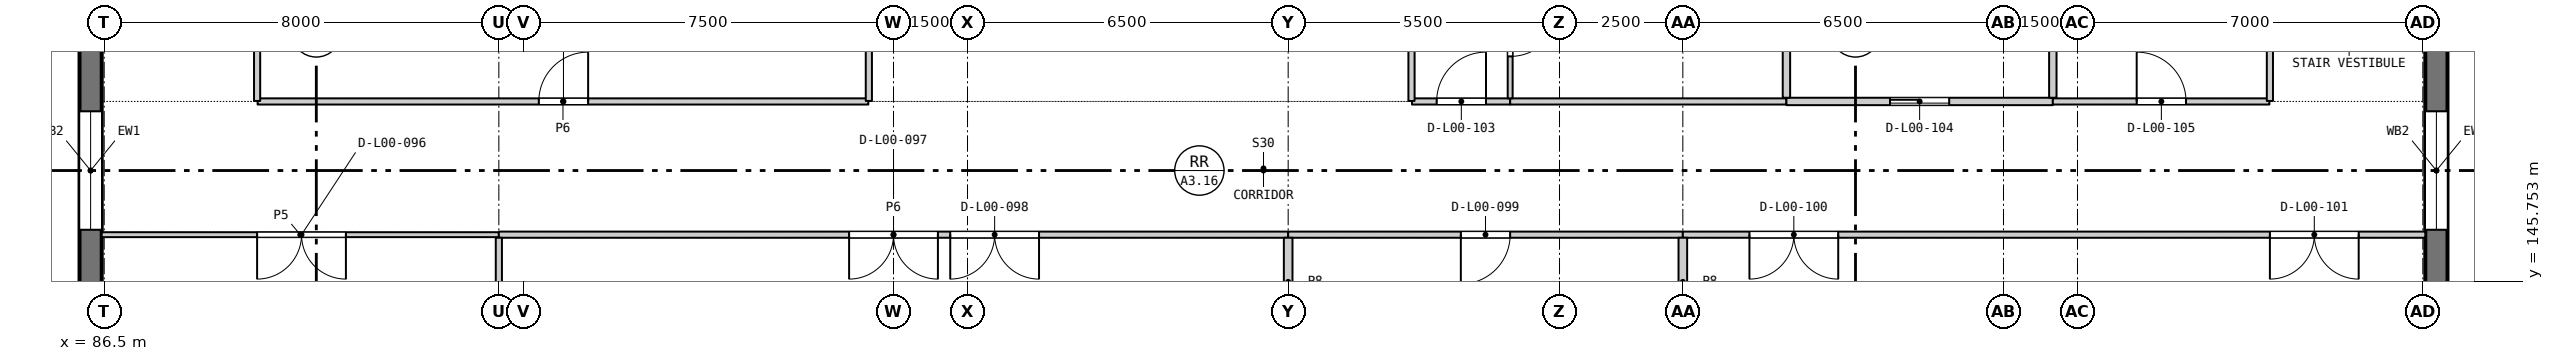
"""IFC4 building model, lengths in metres.
Left out: names, types, materials, properties, quantities, classifications, styles, units other than length and angle.
Written with IfcOpenShell. Run it as: python <this file> out.ifc"""

import sys

from ifc_helpers import new_model, si_unit, direction, frame, frame_2d, origin, place, context, subcontext, project, spatial, rectangle, extrude, element, fill, save


model = new_model("IFC4")
c1 = context("Model", 3, precision=1e-05, world=origin(), true_north=direction((0.0, 1.0)))
c2 = subcontext(c1, "Body", "Model", "MODEL_VIEW")
j1 = project(units=[si_unit("LENGTHUNIT", "METRE"), si_unit("PLANEANGLEUNIT", "RADIAN")], contexts=[c1])
p1 = place(None, origin())
s1 = spatial("IfcSite", under=j1, at=p1, CompositionType="ELEMENT")
p2 = place(p1, origin())
s2 = spatial("IfcBuilding", under=s1, at=p2, CompositionType="ELEMENT")
p3 = place(p2, origin())
s3 = spatial("IfcBuildingStorey", under=s2, at=p3, CompositionType="ELEMENT", Elevation=0.0)
p4 = place(p3, frame((86.225, 144.85, 0.0), z_axis=(0.0, 0.0, 1.0), x_axis=(0.0, 1.0, 0.0)))
e1 = element("IfcWall", 1, at=p4, inside=s3, PredefinedType="SOLIDWALL", context=c2, shape_type="SweptSolid", body=[
    extrude(rectangle(XDim=6.3, YDim=0.45, at=frame_2d((3.15, 0.0))), origin(), (0.0, 0.0, 1.0), 5.0),
])
p5 = place(p4, frame((1.95, 0.0, 0.9)))
e2 = element("IfcOpeningElement", 2, at=p5, cuts=e1, PredefinedType="OPENING", context=c2, shape_type="SweptSolid", body=[
    extrude(rectangle(XDim=2.4, YDim=1.6, at=frame_2d((1.2, 0.8))), frame((0.0, 0.235, 0.0), z_axis=(0.0, -1.0, 0.0), x_axis=(1.0, 0.0, 0.0)), (0.0, 0.0, 1.0), 0.47),
])
p6 = place(p3, frame((133.775, 151.15, 0.0), z_axis=(0.0, 0.0, 1.0), x_axis=(0.0, -1.0, 0.0)))
e3 = element("IfcWall", 3, at=p6, inside=s3, PredefinedType="SOLIDWALL", context=c2, shape_type="SweptSolid", body=[
    extrude(rectangle(XDim=6.3, YDim=0.45, at=frame_2d((3.15, 0.0))), origin(), (0.0, 0.0, 1.0), 5.0),
])
p7 = place(p6, frame((1.95, 0.0, 0.9)))
e4 = element("IfcOpeningElement", 4, at=p7, cuts=e3, PredefinedType="OPENING", context=c2, shape_type="SweptSolid", body=[
    extrude(rectangle(XDim=2.4, YDim=1.6, at=frame_2d((1.2, 0.8))), frame((0.0, 0.235, 0.0), z_axis=(0.0, -1.0, 0.0), x_axis=(1.0, 0.0, 0.0)), (0.0, 0.0, 1.0), 0.47),
])
p8 = place(p3, frame((86.45, 146.7, 0.0), z_axis=(0.0, 0.0, 1.0), x_axis=(1.0, 0.0, 0.0)))
e5 = element("IfcWall", 5, at=p8, inside=s3, PredefinedType="PARTITIONING", context=c2, shape_type="SweptSolid", body=[
    extrude(rectangle(XDim=8.05, YDim=0.1, at=frame_2d((4.025, 0.0))), origin(), (0.0, 0.0, 1.0), 5.7),
])
p9 = place(p8, frame((3.15, 0.0, 0.0)))
e6 = element("IfcOpeningElement", 6, at=p9, cuts=e5, PredefinedType="OPENING", context=c2, shape_type="SweptSolid", body=[
    extrude(rectangle(XDim=1.8, YDim=2.1, at=frame_2d((0.9, 1.05))), frame((0.0, 0.06, 0.0), z_axis=(0.0, -1.0, 0.0), x_axis=(1.0, 0.0, 0.0)), (0.0, 0.0, 1.0), 0.12),
])
p10 = place(p3, frame((94.5, 146.7, 0.0), z_axis=(0.0, 0.0, 1.0), x_axis=(1.0, 0.0, 0.0)))
e7 = element("IfcWall", 7, at=p10, inside=s3, PredefinedType="PARTITIONING", context=c2, shape_type="SweptSolid", body=[
    extrude(rectangle(XDim=16.0, YDim=0.125, at=frame_2d((8.0, 0.0))), origin(), (0.0, 0.0, 1.0), 5.7),
])
p11 = place(p10, frame((7.1, 0.0, 0.0)))
e8 = element("IfcOpeningElement", 8, at=p11, cuts=e7, PredefinedType="OPENING", context=c2, shape_type="SweptSolid", body=[
    extrude(rectangle(XDim=1.8, YDim=2.1, at=frame_2d((0.9, 1.05))), frame((0.0, 0.073, 0.0), z_axis=(0.0, -1.0, 0.0), x_axis=(1.0, 0.0, 0.0)), (0.0, 0.0, 1.0), 0.145),
])
p12 = place(p10, frame((9.15, 0.0, 0.0)))
e9 = element("IfcOpeningElement", 9, at=p12, cuts=e7, PredefinedType="OPENING", context=c2, shape_type="SweptSolid", body=[
    extrude(rectangle(XDim=1.8, YDim=2.1, at=frame_2d((0.9, 1.05))), frame((0.0, 0.073, 0.0), z_axis=(0.0, -1.0, 0.0), x_axis=(1.0, 0.0, 0.0)), (0.0, 0.0, 1.0), 0.145),
])
p13 = place(p3, frame((110.5, 146.7, 0.0), z_axis=(0.0, 0.0, 1.0), x_axis=(1.0, 0.0, 0.0)))
e10 = element("IfcWall", 10, at=p13, inside=s3, PredefinedType="PARTITIONING", context=c2, shape_type="SweptSolid", body=[
    extrude(rectangle(XDim=8.0, YDim=0.125, at=frame_2d((4.0, 0.0))), origin(), (0.0, 0.0, 1.0), 5.7),
])
p14 = place(p13, frame((3.5, 0.0, 0.0)))
e11 = element("IfcOpeningElement", 11, at=p14, cuts=e10, PredefinedType="OPENING", context=c2, shape_type="SweptSolid", body=[
    extrude(rectangle(XDim=1.0, YDim=2.1, at=frame_2d((0.5, 1.05))), frame((0.0, 0.073, 0.0), z_axis=(0.0, -1.0, 0.0), x_axis=(1.0, 0.0, 0.0)), (0.0, 0.0, 1.0), 0.145),
])
p15 = place(p3, frame((118.5, 146.7, 0.0), z_axis=(0.0, 0.0, 1.0), x_axis=(1.0, 0.0, 0.0)))
e12 = element("IfcWall", 12, at=p15, inside=s3, PredefinedType="PARTITIONING", context=c2, shape_type="SweptSolid", body=[
    extrude(rectangle(XDim=15.05, YDim=0.125, at=frame_2d((7.525, 0.0))), origin(), (0.0, 0.0, 1.0), 5.7),
])
p16 = place(p15, frame((1.35, 0.0, 0.0)))
e13 = element("IfcOpeningElement", 13, at=p16, cuts=e12, PredefinedType="OPENING", context=c2, shape_type="SweptSolid", body=[
    extrude(rectangle(XDim=1.8, YDim=2.1, at=frame_2d((0.9, 1.05))), frame((0.0, 0.073, 0.0), z_axis=(0.0, -1.0, 0.0), x_axis=(1.0, 0.0, 0.0)), (0.0, 0.0, 1.0), 0.145),
])
p17 = place(p15, frame((11.9, 0.0, 0.0)))
e14 = element("IfcOpeningElement", 14, at=p17, cuts=e12, PredefinedType="OPENING", context=c2, shape_type="SweptSolid", body=[
    extrude(rectangle(XDim=1.8, YDim=2.1, at=frame_2d((0.9, 1.05))), frame((0.0, 0.073, 0.0), z_axis=(0.0, -1.0, 0.0), x_axis=(1.0, 0.0, 0.0)), (0.0, 0.0, 1.0), 0.145),
])
p18 = place(p3, frame((89.61, 149.4, 0.0), z_axis=(0.0, 0.0, 1.0), x_axis=(1.0, 0.0, 0.0)))
e15 = element("IfcWall", 15, at=p18, inside=s3, PredefinedType="PARTITIONING", context=c2, shape_type="SweptSolid", body=[
    extrude(rectangle(XDim=12.38, YDim=0.125, at=frame_2d((6.19, 0.0))), origin(), (0.0, 0.0, 1.0), 5.7),
])
p19 = place(p18, frame((5.7, 0.0, 0.0)))
e16 = element("IfcOpeningElement", 16, at=p19, cuts=e15, PredefinedType="OPENING", context=c2, shape_type="SweptSolid", body=[
    extrude(rectangle(XDim=1.0, YDim=2.1, at=frame_2d((0.5, 1.05))), frame((0.0, 0.073, 0.0), z_axis=(0.0, -1.0, 0.0), x_axis=(1.0, 0.0, 0.0)), (0.0, 0.0, 1.0), 0.145),
])
p20 = place(p3, frame((113.01, 149.4, 0.0), z_axis=(0.0, 0.0, 1.0), x_axis=(1.0, 0.0, 0.0)))
e17 = element("IfcWall", 17, at=p20, inside=s3, PredefinedType="PARTITIONING", context=c2, shape_type="SweptSolid", body=[
    extrude(rectangle(XDim=1.99, YDim=0.125, at=frame_2d((0.995, 0.0))), origin(), (0.0, 0.0, 1.0), 5.7),
])
p21 = place(p20, frame((0.5, 0.0, 0.0)))
e18 = element("IfcOpeningElement", 18, at=p21, cuts=e17, PredefinedType="OPENING", context=c2, shape_type="SweptSolid", body=[
    extrude(rectangle(XDim=1.0, YDim=2.1, at=frame_2d((0.5, 1.05))), frame((0.0, 0.073, 0.0), z_axis=(0.0, -1.0, 0.0), x_axis=(1.0, 0.0, 0.0)), (0.0, 0.0, 1.0), 0.145),
])
p22 = place(p3, frame((115.0, 149.4, 0.0), z_axis=(0.0, 0.0, 1.0), x_axis=(1.0, 0.0, 0.0)))
e19 = element("IfcWall", 19, at=p22, inside=s3, PredefinedType="PARTITIONING", context=c2, shape_type="SweptSolid", body=[
    extrude(rectangle(XDim=5.6, YDim=0.125, at=frame_2d((2.8, 0.0))), origin(), (0.0, 0.0, 1.0), 5.7),
])
p23 = place(p3, frame((120.6, 149.4, 0.0), z_axis=(0.0, 0.0, 1.0), x_axis=(1.0, 0.0, 0.0)))
e20 = element("IfcWall", 20, at=p23, inside=s3, PredefinedType="PARTITIONING", context=c2, shape_type="SweptSolid", body=[
    extrude(rectangle(XDim=5.4, YDim=0.15, at=frame_2d((2.7, 0.0))), origin(), (0.0, 0.0, 1.0), 5.7),
])
p24 = place(p23, frame((2.1, 0.0, 0.0)))
e21 = element("IfcOpeningElement", 21, at=p24, cuts=e20, PredefinedType="OPENING", context=c2, shape_type="SweptSolid", body=[
    extrude(rectangle(XDim=1.2, YDim=2.4, at=frame_2d((0.6, 1.2))), frame((0.0, 0.085, 0.0), z_axis=(0.0, -1.0, 0.0), x_axis=(1.0, 0.0, 0.0)), (0.0, 0.0, 1.0), 0.17),
])
p25 = place(p3, frame((126.0, 149.4, 0.0), z_axis=(0.0, 0.0, 1.0), x_axis=(1.0, 0.0, 0.0)))
e22 = element("IfcWall", 22, at=p25, inside=s3, PredefinedType="PARTITIONING", context=c2, shape_type="SweptSolid", body=[
    extrude(rectangle(XDim=4.39, YDim=0.125, at=frame_2d((2.195, 0.0))), origin(), (0.0, 0.0, 1.0), 5.7),
])
p26 = place(p25, frame((1.7, 0.0, 0.0)))
e23 = element("IfcOpeningElement", 23, at=p26, cuts=e22, PredefinedType="OPENING", context=c2, shape_type="SweptSolid", body=[
    extrude(rectangle(XDim=1.0, YDim=2.1, at=frame_2d((0.5, 1.05))), frame((0.0, 0.073, 0.0), z_axis=(0.0, -1.0, 0.0), x_axis=(1.0, 0.0, 0.0)), (0.0, 0.0, 1.0), 0.145),
])
p27 = place(p3, frame((89.6, 149.41, 0.0), z_axis=(0.0, 0.0, 1.0), x_axis=(0.0, 1.0, 0.0)))
e24 = element("IfcWall", 24, at=p27, inside=s3, PredefinedType="PARTITIONING", context=c2, shape_type="SweptSolid", body=[
    extrude(rectangle(XDim=8.29, YDim=0.125, at=frame_2d((4.145, 0.0))), origin(), (0.0, 0.0, 1.0), 5.7),
])
p28 = place(p3, frame((94.5, 144.85, 0.0), z_axis=(0.0, 0.0, 1.0), x_axis=(0.0, 1.0, 0.0)))
e25 = element("IfcWall", 25, at=p28, inside=s3, PredefinedType="PARTITIONING", context=c2, shape_type="SweptSolid", body=[
    extrude(rectangle(XDim=1.787, YDim=0.125, at=frame_2d((0.894, 0.0))), origin(), (0.0, 0.0, 1.0), 5.0),
])
p29 = place(p3, frame((102.0, 149.41, 0.0), z_axis=(0.0, 0.0, 1.0), x_axis=(0.0, 1.0, 0.0)))
e26 = element("IfcWall", 26, at=p29, inside=s3, PredefinedType="PARTITIONING", context=c2, shape_type="SweptSolid", body=[
    extrude(rectangle(XDim=8.29, YDim=0.125, at=frame_2d((4.145, 0.0))), origin(), (0.0, 0.0, 1.0), 5.7),
])
p30 = place(p3, frame((110.5, 144.85, 0.0), z_axis=(0.0, 0.0, 1.0), x_axis=(0.0, 1.0, 0.0)))
e27 = element("IfcWall", 27, at=p30, inside=s3, PredefinedType="PARTITIONING", context=c2, shape_type="SweptSolid", body=[
    extrude(rectangle(XDim=1.787, YDim=0.175, at=frame_2d((0.894, 0.0))), origin(), (0.0, 0.0, 1.0), 5.0),
])
p31 = place(p3, frame((113.0, 149.41, 0.0), z_axis=(0.0, 0.0, 1.0), x_axis=(0.0, 1.0, 0.0)))
e28 = element("IfcWall", 28, at=p31, inside=s3, PredefinedType="PARTITIONING", context=c2, shape_type="SweptSolid", body=[
    extrude(rectangle(XDim=8.29, YDim=0.125, at=frame_2d((4.145, 0.0))), origin(), (0.0, 0.0, 1.0), 5.7),
])
p32 = place(p3, frame((115.0, 149.462, 0.0), z_axis=(0.0, 0.0, 1.0), x_axis=(0.0, 1.0, 0.0)))
e29 = element("IfcWall", 29, at=p32, inside=s3, PredefinedType="PARTITIONING", context=c2, shape_type="SweptSolid", body=[
    extrude(rectangle(XDim=2.704, YDim=0.1, at=frame_2d((1.352, 0.0))), origin(), (0.0, 0.0, 1.0), 5.7),
])
p33 = place(p32, frame((0.85, 0.0, 0.0)))
e30 = element("IfcOpeningElement", 30, at=p33, cuts=e29, PredefinedType="OPENING", context=c2, shape_type="SweptSolid", body=[
    extrude(rectangle(XDim=1.0, YDim=2.1, at=frame_2d((0.5, 1.05))), frame((0.0, 0.06, 0.0), z_axis=(0.0, -1.0, 0.0), x_axis=(1.0, 0.0, 0.0)), (0.0, 0.0, 1.0), 0.12),
])
p34 = place(p3, frame((118.5, 144.85, 0.0), z_axis=(0.0, 0.0, 1.0), x_axis=(0.0, 1.0, 0.0)))
e31 = element("IfcWall", 31, at=p34, inside=s3, PredefinedType="PARTITIONING", context=c2, shape_type="SweptSolid", body=[
    extrude(rectangle(XDim=1.787, YDim=0.175, at=frame_2d((0.894, 0.0))), origin(), (0.0, 0.0, 1.0), 5.0),
])
p35 = place(p3, frame((120.6, 149.475, 0.0), z_axis=(0.0, 0.0, 1.0), x_axis=(0.0, 1.0, 0.0)))
e32 = element("IfcWall", 32, at=p35, inside=s3, PredefinedType="PARTITIONING", context=c2, shape_type="SweptSolid", body=[
    extrude(rectangle(XDim=2.692, YDim=0.15, at=frame_2d((1.346, 0.0))), origin(), (0.0, 0.0, 1.0), 5.7),
])
p36 = place(p3, frame((126.0, 149.475, 0.0), z_axis=(0.0, 0.0, 1.0), x_axis=(0.0, 1.0, 0.0)))
e33 = element("IfcWall", 33, at=p36, inside=s3, PredefinedType="PARTITIONING", context=c2, shape_type="SweptSolid", body=[
    extrude(rectangle(XDim=8.15, YDim=0.15, at=frame_2d((4.075, 0.0))), origin(), (0.0, 0.0, 1.0), 5.7),
])
p37 = place(p3, frame((130.4, 149.41, 0.0), z_axis=(0.0, 0.0, 1.0), x_axis=(0.0, 1.0, 0.0)))
e34 = element("IfcWall", 34, at=p37, inside=s3, PredefinedType="PARTITIONING", context=c2, shape_type="SweptSolid", body=[
    extrude(rectangle(XDim=8.29, YDim=0.125, at=frame_2d((4.145, 0.0))), origin(), (0.0, 0.0, 1.0), 5.7),
])
p38 = place(p5, origin())
e35 = element("IfcWindow", 35, at=p38, inside=s3, PartitioningType="SINGLE_PANEL", PredefinedType="WINDOW", context=c2, shape_type="SweptSolid", body=[
    extrude(rectangle(XDim=2.4, YDim=1.6, at=frame_2d((1.2, 0.8))), frame((0.0, -0.125, 0.0), z_axis=(0.0, -1.0, 0.0), x_axis=(1.0, 0.0, 0.0)), (0.0, 0.0, 1.0), 0.06),
])
fill(e2, e35)
p39 = place(p7, origin())
e36 = element("IfcWindow", 36, at=p39, inside=s3, PartitioningType="SINGLE_PANEL", PredefinedType="WINDOW", context=c2, shape_type="SweptSolid", body=[
    extrude(rectangle(XDim=2.4, YDim=1.6, at=frame_2d((1.2, 0.8))), frame((0.0, -0.125, 0.0), z_axis=(0.0, -1.0, 0.0), x_axis=(1.0, 0.0, 0.0)), (0.0, 0.0, 1.0), 0.06),
])
fill(e4, e36)
p40 = place(p9, frame((1.8, 0.0, 0.0), z_axis=(0.0, 0.0, 1.0), x_axis=(-1.0, 0.0, 0.0)))
e37 = element("IfcDoor", 37, at=p40, inside=s3, OperationType="DOUBLE_DOOR_SINGLE_SWING", PredefinedType="DOOR", context=c2, shape_type="SweptSolid", body=[
    extrude(rectangle(XDim=1.8, YDim=2.1, at=frame_2d((0.9, 1.05))), frame((0.0, 0.025, 0.0), z_axis=(0.0, -1.0, 0.0), x_axis=(1.0, 0.0, 0.0)), (0.0, 0.0, 1.0), 0.05),
])
fill(e6, e37)
p41 = place(p11, frame((1.8, 0.0, 0.0), z_axis=(0.0, 0.0, 1.0), x_axis=(-1.0, 0.0, 0.0)))
e38 = element("IfcDoor", 38, at=p41, inside=s3, OperationType="DOUBLE_DOOR_SINGLE_SWING", PredefinedType="DOOR", context=c2, shape_type="SweptSolid", body=[
    extrude(rectangle(XDim=1.8, YDim=2.1, at=frame_2d((0.9, 1.05))), frame((0.0, 0.025, 0.0), z_axis=(0.0, -1.0, 0.0), x_axis=(1.0, 0.0, 0.0)), (0.0, 0.0, 1.0), 0.05),
])
fill(e8, e38)
p42 = place(p12, frame((1.8, 0.0, 0.0), z_axis=(0.0, 0.0, 1.0), x_axis=(-1.0, 0.0, 0.0)))
e39 = element("IfcDoor", 39, at=p42, inside=s3, OperationType="DOUBLE_DOOR_SINGLE_SWING", PredefinedType="DOOR", context=c2, shape_type="SweptSolid", body=[
    extrude(rectangle(XDim=1.8, YDim=2.1, at=frame_2d((0.9, 1.05))), frame((0.0, 0.025, 0.0), z_axis=(0.0, -1.0, 0.0), x_axis=(1.0, 0.0, 0.0)), (0.0, 0.0, 1.0), 0.05),
])
fill(e9, e39)
p43 = place(p14, frame((1.0, 0.0, 0.0), z_axis=(0.0, 0.0, 1.0), x_axis=(-1.0, 0.0, 0.0)))
e40 = element("IfcDoor", 40, at=p43, inside=s3, OperationType="SINGLE_SWING_RIGHT", PredefinedType="DOOR", context=c2, shape_type="SweptSolid", body=[
    extrude(rectangle(XDim=1.0, YDim=2.1, at=frame_2d((0.5, 1.05))), frame((0.0, 0.025, 0.0), z_axis=(0.0, -1.0, 0.0), x_axis=(1.0, 0.0, 0.0)), (0.0, 0.0, 1.0), 0.05),
])
fill(e11, e40)
p44 = place(p16, frame((1.8, 0.0, 0.0), z_axis=(0.0, 0.0, 1.0), x_axis=(-1.0, 0.0, 0.0)))
e41 = element("IfcDoor", 41, at=p44, inside=s3, OperationType="DOUBLE_DOOR_SINGLE_SWING", PredefinedType="DOOR", context=c2, shape_type="SweptSolid", body=[
    extrude(rectangle(XDim=1.8, YDim=2.1, at=frame_2d((0.9, 1.05))), frame((0.0, 0.025, 0.0), z_axis=(0.0, -1.0, 0.0), x_axis=(1.0, 0.0, 0.0)), (0.0, 0.0, 1.0), 0.05),
])
fill(e13, e41)
p45 = place(p17, frame((1.8, 0.0, 0.0), z_axis=(0.0, 0.0, 1.0), x_axis=(-1.0, 0.0, 0.0)))
e42 = element("IfcDoor", 42, at=p45, inside=s3, OperationType="DOUBLE_DOOR_SINGLE_SWING", PredefinedType="DOOR", context=c2, shape_type="SweptSolid", body=[
    extrude(rectangle(XDim=1.8, YDim=2.1, at=frame_2d((0.9, 1.05))), frame((0.0, 0.025, 0.0), z_axis=(0.0, -1.0, 0.0), x_axis=(1.0, 0.0, 0.0)), (0.0, 0.0, 1.0), 0.05),
])
fill(e14, e42)
p46 = place(p19, origin())
e43 = element("IfcDoor", 43, at=p46, inside=s3, OperationType="SINGLE_SWING_RIGHT", PredefinedType="DOOR", context=c2, shape_type="SweptSolid", body=[
    extrude(rectangle(XDim=1.0, YDim=2.1, at=frame_2d((0.5, 1.05))), frame((0.0, 0.025, 0.0), z_axis=(0.0, -1.0, 0.0), x_axis=(1.0, 0.0, 0.0)), (0.0, 0.0, 1.0), 0.05),
])
fill(e16, e43)
p47 = place(p21, origin())
e44 = element("IfcDoor", 44, at=p47, inside=s3, OperationType="SINGLE_SWING_RIGHT", PredefinedType="DOOR", context=c2, shape_type="SweptSolid", body=[
    extrude(rectangle(XDim=1.0, YDim=2.1, at=frame_2d((0.5, 1.05))), frame((0.0, 0.025, 0.0), z_axis=(0.0, -1.0, 0.0), x_axis=(1.0, 0.0, 0.0)), (0.0, 0.0, 1.0), 0.05),
])
fill(e18, e44)
p48 = place(p24, origin())
e45 = element("IfcDoor", 45, at=p48, inside=s3, OperationType="SLIDING_TO_LEFT", PredefinedType="DOOR", context=c2, shape_type="SweptSolid", body=[
    extrude(rectangle(XDim=1.2, YDim=2.4, at=frame_2d((0.6, 1.2))), frame((0.0, 0.025, 0.0), z_axis=(0.0, -1.0, 0.0), x_axis=(1.0, 0.0, 0.0)), (0.0, 0.0, 1.0), 0.05),
])
fill(e21, e45)
p49 = place(p26, origin())
e46 = element("IfcDoor", 46, at=p49, inside=s3, OperationType="SINGLE_SWING_LEFT", PredefinedType="DOOR", context=c2, shape_type="SweptSolid", body=[
    extrude(rectangle(XDim=1.0, YDim=2.1, at=frame_2d((0.5, 1.05))), frame((0.0, 0.025, 0.0), z_axis=(0.0, -1.0, 0.0), x_axis=(1.0, 0.0, 0.0)), (0.0, 0.0, 1.0), 0.05),
])
fill(e23, e46)
p50 = place(p33, frame((1.0, 0.0, 0.0), z_axis=(0.0, 0.0, 1.0), x_axis=(-1.0, 0.0, 0.0)))
e47 = element("IfcDoor", 47, at=p50, inside=s3, OperationType="SINGLE_SWING_LEFT", PredefinedType="DOOR", context=c2, shape_type="SweptSolid", body=[
    extrude(rectangle(XDim=1.0, YDim=2.1, at=frame_2d((0.5, 1.05))), frame((0.0, 0.025, 0.0), z_axis=(0.0, -1.0, 0.0), x_axis=(1.0, 0.0, 0.0)), (0.0, 0.0, 1.0), 0.05),
])
fill(e30, e47)
save(model, sys.argv[1])
